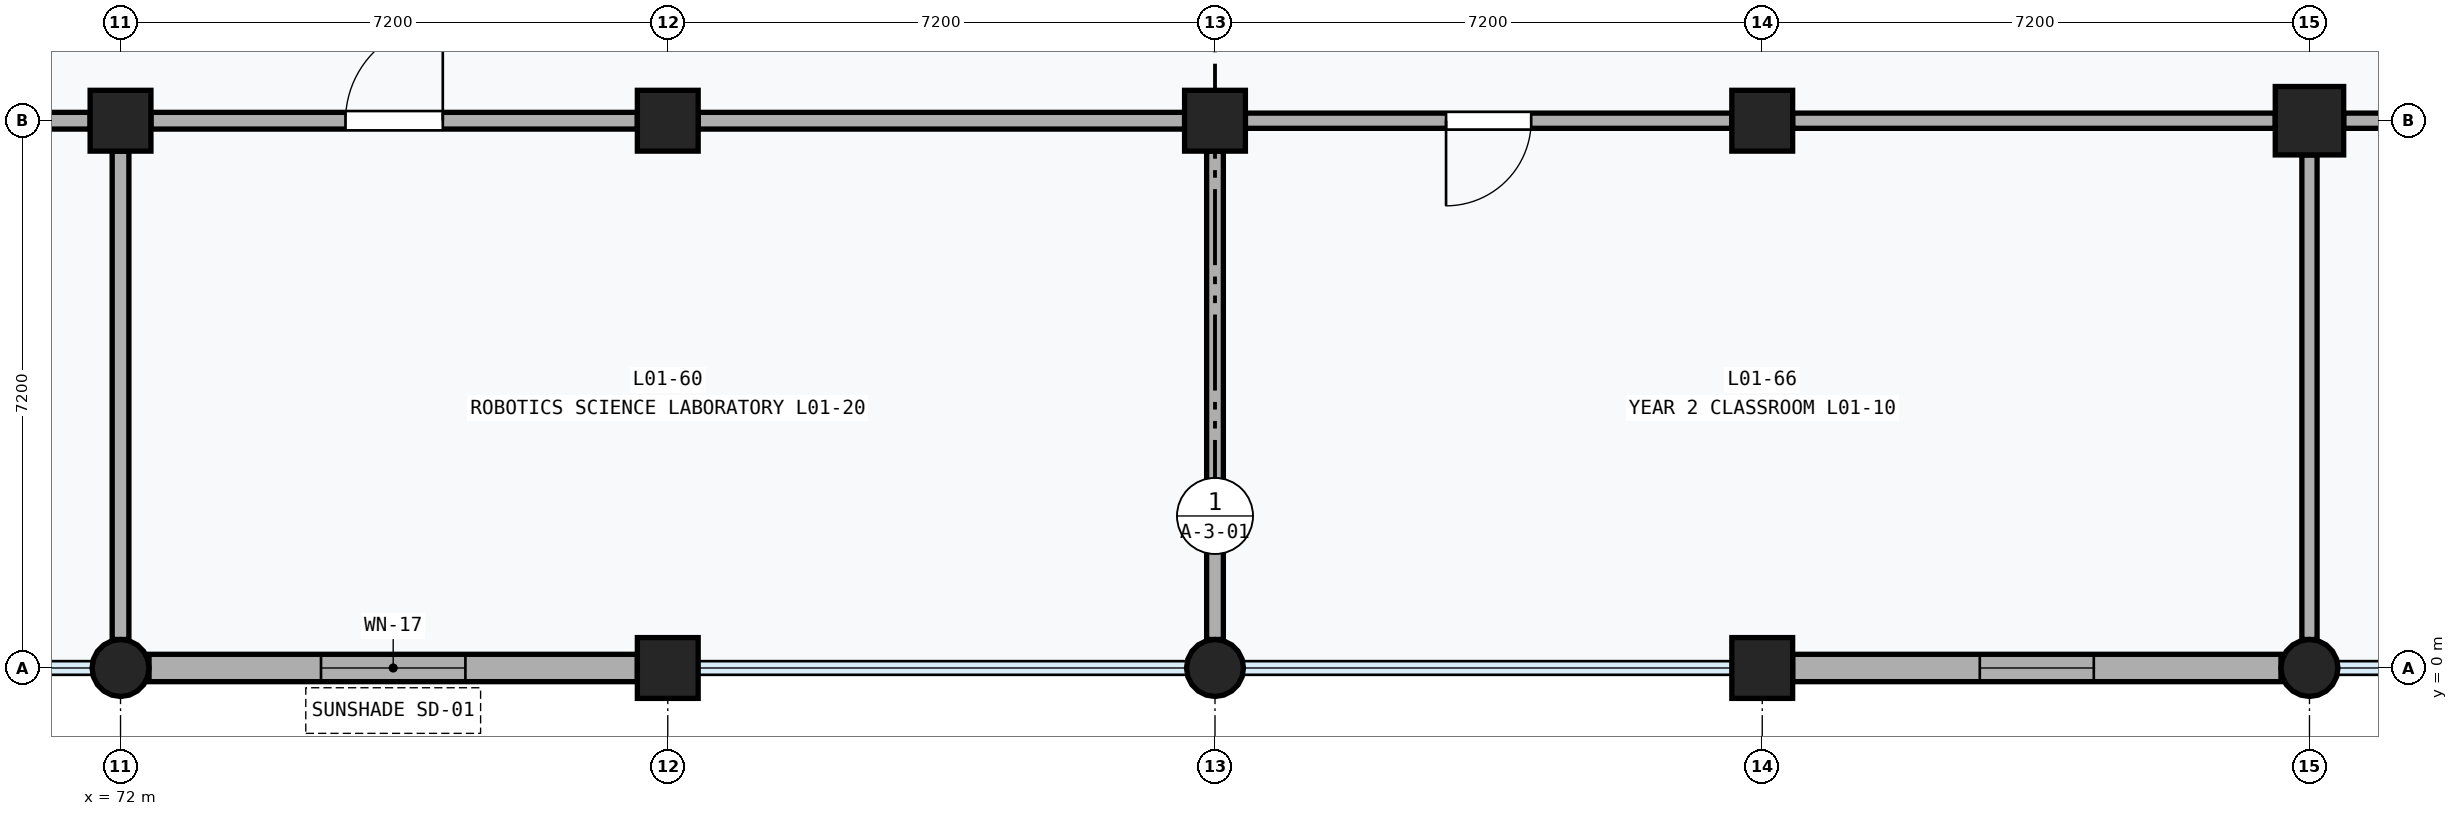
"""IFC4 building model, lengths in metres.
Left out: names, types, materials, properties, quantities, classifications, styles, units other than length and angle.
Written with IfcOpenShell. Run it as: python <this file> out.ifc"""

import sys

from ifc_helpers import new_model, si_unit, direction, frame, frame_2d, origin, origin_2d, place, context, subcontext, project, spatial, rectangle, circle, extrude, element, fill, save


model = new_model("IFC4")
c1 = context("Model", 3, precision=1e-05, world=origin(), true_north=direction((0.0, 1.0)))
c2 = subcontext(c1, "Body", "Model", "MODEL_VIEW")
j1 = project(units=[si_unit("LENGTHUNIT", "METRE"), si_unit("PLANEANGLEUNIT", "RADIAN")], contexts=[c1])
p1 = place(None, origin())
s1 = spatial("IfcSite", under=j1, at=p1, CompositionType="ELEMENT")
p2 = place(p1, origin())
s2 = spatial("IfcBuilding", under=s1, at=p2, CompositionType="ELEMENT")
p3 = place(p2, frame((0.0, 0.0, 4.8)))
s3 = spatial("IfcBuildingStorey", under=s2, at=p3, CompositionType="ELEMENT", Elevation=4.8)
p4 = place(p3, frame((72.0, 0.0, 0.0), z_axis=(0.0, 0.0, 1.0), x_axis=(1.0, 0.0, 0.0)))
e1 = element("IfcColumn", 1, at=p4, inside=s3, PredefinedType="COLUMN", context=c2, shape_type="SweptSolid", body=[
    extrude(circle(Radius=0.375, at=origin_2d()), origin(), (0.0, 0.0, 1.0), 4.8),
])
for number, where, z_axis, x_axis in (
    (2, (72.0, 7.2, 0.0), (0.0, 0.0, 1.0), (1.0, 0.0, 0.0)),
    (3, (79.2, 0.0, 0.0), (0.0, 0.0, 1.0), (1.0, 0.0, 0.0)),
    (4, (79.2, 7.2, 0.0), (0.0, 0.0, 1.0), (1.0, 0.0, 0.0)),
):
    element("IfcColumn", number, at=place(p3, frame(where, z_axis=z_axis, x_axis=x_axis)), inside=s3, PredefinedType="COLUMN", context=c2, shape_type="SweptSolid", body=[
        extrude(rectangle(XDim=0.8, YDim=0.8, at=origin_2d()), origin(), (0.0, 0.0, 1.0), 4.8),
    ])
p5 = place(p3, frame((86.4, 0.0, 0.0), z_axis=(0.0, 0.0, 1.0), x_axis=(1.0, 0.0, 0.0)))
e5 = element("IfcColumn", 5, at=p5, inside=s3, PredefinedType="COLUMN", context=c2, shape_type="SweptSolid", body=[
    extrude(circle(Radius=0.375, at=origin_2d()), origin(), (0.0, 0.0, 1.0), 4.8),
])
for number, where, z_axis, x_axis in (
    (6, (86.4, 7.2, 0.0), (0.0, 0.0, 1.0), (1.0, 0.0, 0.0)),
    (7, (93.6, 0.0, 0.0), (0.0, 0.0, 1.0), (1.0, 0.0, 0.0)),
    (8, (93.6, 7.2, 0.0), (0.0, 0.0, 1.0), (1.0, 0.0, 0.0)),
):
    element("IfcColumn", number, at=place(p3, frame(where, z_axis=z_axis, x_axis=x_axis)), inside=s3, PredefinedType="COLUMN", context=c2, shape_type="SweptSolid", body=[
        extrude(rectangle(XDim=0.8, YDim=0.8, at=origin_2d()), origin(), (0.0, 0.0, 1.0), 4.8),
    ])
p6 = place(p3, frame((100.8, 0.0, 0.0), z_axis=(0.0, 0.0, 1.0), x_axis=(1.0, 0.0, 0.0)))
e9 = element("IfcColumn", 9, at=p6, inside=s3, PredefinedType="COLUMN", context=c2, shape_type="SweptSolid", body=[
    extrude(circle(Radius=0.375, at=origin_2d()), origin(), (0.0, 0.0, 1.0), 4.8),
])
p7 = place(p3, frame((100.8, 7.2, 0.0), z_axis=(0.0, 0.0, 1.0), x_axis=(1.0, 0.0, 0.0)))
e10 = element("IfcColumn", 10, at=p7, inside=s3, PredefinedType="COLUMN", context=c2, shape_type="SweptSolid", body=[
    extrude(rectangle(XDim=0.9, YDim=0.9, at=origin_2d()), origin(), (0.0, 0.0, 1.0), 4.8),
])
p8 = place(p3, frame((72.375, 0.0, 0.0), z_axis=(0.0, 0.0, 1.0), x_axis=(1.0, 0.0, 0.0)))
e11 = element("IfcWall", 11, at=p8, inside=s3, PredefinedType="SOLIDWALL", context=c2, shape_type="SweptSolid", body=[
    extrude(rectangle(XDim=6.425, YDim=0.36, at=frame_2d((3.212, 0.0))), origin(), (0.0, 0.0, 1.0), 3.85),
])
p9 = place(p8, frame((2.262, 0.0, 1.1)))
e12 = element("IfcOpeningElement", 12, at=p9, cuts=e11, PredefinedType="OPENING", context=c2, shape_type="SweptSolid", body=[
    extrude(rectangle(XDim=1.9, YDim=1.5, at=frame_2d((0.95, 0.75))), frame((0.0, 0.192, 0.0), z_axis=(0.0, -1.0, 0.0), x_axis=(1.0, 0.0, 0.0)), (0.0, 0.0, 1.0), 0.384),
])
p10 = place(p3, frame((94.0, 0.0, 0.0), z_axis=(0.0, 0.0, 1.0), x_axis=(1.0, 0.0, 0.0)))
e13 = element("IfcWall", 13, at=p10, inside=s3, PredefinedType="SOLIDWALL", context=c2, shape_type="SweptSolid", body=[
    extrude(rectangle(XDim=6.425, YDim=0.36, at=frame_2d((3.212, 0.0))), origin(), (0.0, 0.0, 1.0), 3.85),
])
p11 = place(p10, frame((2.462, 0.0, 1.2)))
e14 = element("IfcOpeningElement", 14, at=p11, cuts=e13, PredefinedType="OPENING", context=c2, shape_type="SweptSolid", body=[
    extrude(rectangle(XDim=1.5, YDim=1.35, at=frame_2d((0.75, 0.675))), frame((0.0, 0.192, 0.0), z_axis=(0.0, -1.0, 0.0), x_axis=(1.0, 0.0, 0.0)), (0.0, 0.0, 1.0), 0.384),
])
p12 = place(p3, frame((65.25, 7.2, 0.0), z_axis=(0.0, 0.0, 1.0), x_axis=(1.0, 0.0, 0.0)))
e15 = element("IfcWall", 15, at=p12, inside=s3, PredefinedType="PARTITIONING", context=c2, shape_type="SweptSolid", body=[
    extrude(rectangle(XDim=6.35, YDim=0.22, at=frame_2d((3.175, 0.0))), origin(), (0.0, 0.0, 1.0), 3.58),
])
p13 = place(p3, frame((72.0, 0.375, 0.0), z_axis=(0.0, 0.0, 1.0), x_axis=(0.0, 1.0, 0.0)))
e16 = element("IfcWall", 16, at=p13, inside=s3, PredefinedType="PARTITIONING", context=c2, shape_type="SweptSolid", body=[
    extrude(rectangle(XDim=6.425, YDim=0.22, at=frame_2d((3.212, 0.0))), origin(), (0.0, 0.0, 1.0), 3.58),
])
p14 = place(p3, frame((72.4, 7.2, 0.0), z_axis=(0.0, 0.0, 1.0), x_axis=(1.0, 0.0, 0.0)))
e17 = element("IfcWall", 17, at=p14, inside=s3, PredefinedType="PARTITIONING", context=c2, shape_type="SweptSolid", body=[
    extrude(rectangle(XDim=6.4, YDim=0.22, at=frame_2d((3.2, 0.0))), origin(), (0.0, 0.0, 1.0), 3.58),
])
p15 = place(p14, frame((2.56, 0.0, 0.0)))
e18 = element("IfcOpeningElement", 18, at=p15, cuts=e17, PredefinedType="OPENING", context=c2, shape_type="SweptSolid", body=[
    extrude(rectangle(XDim=1.28, YDim=2.28, at=frame_2d((0.64, 1.14))), frame((0.0, 0.122, 0.0), z_axis=(0.0, -1.0, 0.0), x_axis=(1.0, 0.0, 0.0)), (0.0, 0.0, 1.0), 0.244),
])
p16 = place(p3, frame((79.6, 7.2, 0.0), z_axis=(0.0, 0.0, 1.0), x_axis=(1.0, 0.0, 0.0)))
e19 = element("IfcWall", 19, at=p16, inside=s3, PredefinedType="PARTITIONING", context=c2, shape_type="SweptSolid", body=[
    extrude(rectangle(XDim=6.4, YDim=0.22, at=frame_2d((3.2, 0.0))), origin(), (0.0, 0.0, 1.0), 3.58),
])
p17 = place(p3, frame((86.4, 0.375, 0.0), z_axis=(0.0, 0.0, 1.0), x_axis=(0.0, 1.0, 0.0)))
e20 = element("IfcWall", 20, at=p17, inside=s3, PredefinedType="PARTITIONING", context=c2, shape_type="SweptSolid", body=[
    extrude(rectangle(XDim=6.425, YDim=0.22, at=frame_2d((3.212, 0.0))), origin(), (0.0, 0.0, 1.0), 3.58),
])
p18 = place(p3, frame((86.8, 7.2, 0.0), z_axis=(0.0, 0.0, 1.0), x_axis=(1.0, 0.0, 0.0)))
e21 = element("IfcWall", 21, at=p18, inside=s3, PredefinedType="PARTITIONING", context=c2, shape_type="SweptSolid", body=[
    extrude(rectangle(XDim=6.4, YDim=0.2, at=frame_2d((3.2, 0.0))), origin(), (0.0, 0.0, 1.0), 3.58),
])
p19 = place(p18, frame((2.64, 0.0, 0.0)))
e22 = element("IfcOpeningElement", 22, at=p19, cuts=e21, PredefinedType="OPENING", context=c2, shape_type="SweptSolid", body=[
    extrude(rectangle(XDim=1.12, YDim=2.2, at=frame_2d((0.56, 1.1))), frame((0.0, 0.112, 0.0), z_axis=(0.0, -1.0, 0.0), x_axis=(1.0, 0.0, 0.0)), (0.0, 0.0, 1.0), 0.224),
])
p20 = place(p3, frame((94.0, 7.2, 0.0), z_axis=(0.0, 0.0, 1.0), x_axis=(1.0, 0.0, 0.0)))
e23 = element("IfcWall", 23, at=p20, inside=s3, PredefinedType="PARTITIONING", context=c2, shape_type="SweptSolid", body=[
    extrude(rectangle(XDim=6.35, YDim=0.2, at=frame_2d((3.175, 0.0))), origin(), (0.0, 0.0, 1.0), 3.58),
])
p21 = place(p3, frame((100.8, 0.375, 0.0), z_axis=(0.0, 0.0, 1.0), x_axis=(0.0, 1.0, 0.0)))
e24 = element("IfcWall", 24, at=p21, inside=s3, PredefinedType="PARTITIONING", context=c2, shape_type="SweptSolid", body=[
    extrude(rectangle(XDim=6.375, YDim=0.2, at=frame_2d((3.188, 0.0))), origin(), (0.0, 0.0, 1.0), 3.58),
])
p22 = place(p3, frame((101.25, 7.2, 0.0), z_axis=(0.0, 0.0, 1.0), x_axis=(1.0, 0.0, 0.0)))
e25 = element("IfcWall", 25, at=p22, inside=s3, PredefinedType="PARTITIONING", context=c2, shape_type="SweptSolid", body=[
    extrude(rectangle(XDim=6.3, YDim=0.2, at=frame_2d((3.15, 0.0))), origin(), (0.0, 0.0, 1.0), 3.58),
])
p23 = place(p22, frame((2.64, 0.0, 0.0)))
e26 = element("IfcOpeningElement", 26, at=p23, cuts=e25, PredefinedType="OPENING", context=c2, shape_type="SweptSolid", body=[
    extrude(rectangle(XDim=1.02, YDim=2.12, at=frame_2d((0.51, 1.06))), frame((0.0, 0.112, 0.0), z_axis=(0.0, -1.0, 0.0), x_axis=(1.0, 0.0, 0.0)), (0.0, 0.0, 1.0), 0.224),
])
p24 = place(p9, origin())
e27 = element("IfcWindow", 27, at=p24, inside=s3, PartitioningType="SINGLE_PANEL", PredefinedType="WINDOW", context=c2, shape_type="SweptSolid", body=[
    extrude(rectangle(XDim=1.9, YDim=1.5, at=frame_2d((0.95, 0.75))), frame((0.0, 0.03, 0.0), z_axis=(0.0, -1.0, 0.0), x_axis=(1.0, 0.0, 0.0)), (0.0, 0.0, 1.0), 0.06),
])
fill(e12, e27)
p25 = place(p11, origin())
e28 = element("IfcWindow", 28, at=p25, inside=s3, PartitioningType="SINGLE_PANEL", PredefinedType="WINDOW", context=c2, shape_type="SweptSolid", body=[
    extrude(rectangle(XDim=1.5, YDim=1.35, at=frame_2d((0.75, 0.675))), frame((0.0, 0.03, 0.0), z_axis=(0.0, -1.0, 0.0), x_axis=(1.0, 0.0, 0.0)), (0.0, 0.0, 1.0), 0.06),
])
fill(e14, e28)
p26 = place(p15, origin())
e29 = element("IfcDoor", 29, at=p26, inside=s3, OperationType="SINGLE_SWING_RIGHT", PredefinedType="DOOR", context=c2, shape_type="SweptSolid", body=[
    extrude(rectangle(XDim=1.28, YDim=2.28, at=frame_2d((0.64, 1.14))), frame((0.0, 0.025, 0.0), z_axis=(0.0, -1.0, 0.0), x_axis=(1.0, 0.0, 0.0)), (0.0, 0.0, 1.0), 0.05),
])
fill(e18, e29)
p27 = place(p19, frame((1.12, 0.0, 0.0), z_axis=(0.0, 0.0, 1.0), x_axis=(-1.0, 0.0, 0.0)))
e30 = element("IfcDoor", 30, at=p27, inside=s3, OperationType="SINGLE_SWING_RIGHT", PredefinedType="DOOR", context=c2, shape_type="SweptSolid", body=[
    extrude(rectangle(XDim=1.12, YDim=2.2, at=frame_2d((0.56, 1.1))), frame((0.0, 0.025, 0.0), z_axis=(0.0, -1.0, 0.0), x_axis=(1.0, 0.0, 0.0)), (0.0, 0.0, 1.0), 0.05),
])
fill(e22, e30)
save(model, sys.argv[1])
